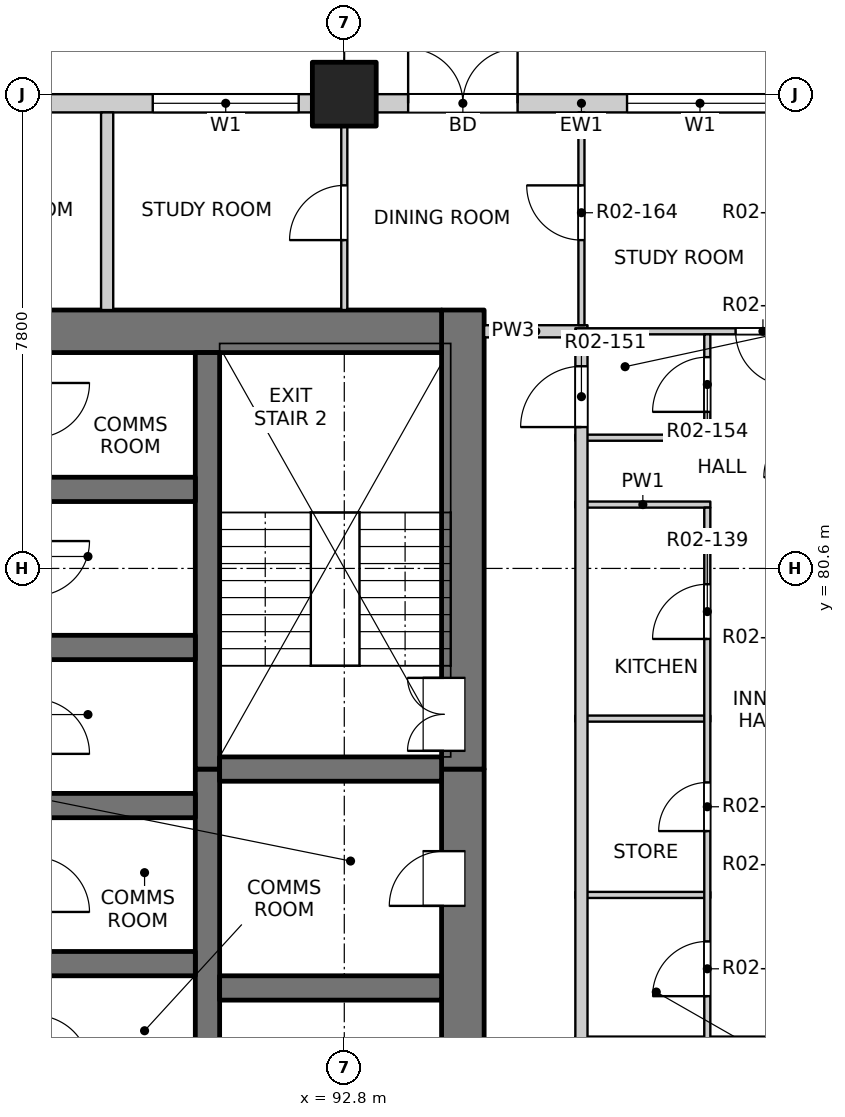
"""IFC4 building model, lengths in metres.
Left out: names, types, materials, properties, quantities, classifications, styles, units other than length and angle.
Written with IfcOpenShell. Run it as: python <this file> out.ifc"""

import sys

from ifc_helpers import new_model, si_unit, direction, frame, frame_2d, origin, origin_2d, place, context, subcontext, project, spatial, rectangle, extrude, element, fill, save


model = new_model("IFC4")
c1 = context("Model", 3, precision=1e-05, world=origin(), true_north=direction((0.0, 1.0)))
c2 = subcontext(c1, "Body", "Model", "MODEL_VIEW")
j1 = project(units=[si_unit("LENGTHUNIT", "METRE"), si_unit("PLANEANGLEUNIT", "RADIAN")], contexts=[c1])
p1 = place(None, origin())
s1 = spatial("IfcSite", under=j1, at=p1, CompositionType="ELEMENT")
p2 = place(p1, origin())
s2 = spatial("IfcBuilding", under=s1, at=p2, CompositionType="ELEMENT")
p3 = place(p2, frame((0.0, 0.0, 36.5)))
s3 = spatial("IfcBuildingStorey", under=s2, at=p3, CompositionType="ELEMENT", Elevation=36.5)
p4 = place(p3, frame((92.8, 88.4, -0.25), z_axis=(0.0, 0.0, 1.0), x_axis=(1.0, 0.0, 0.0)))
e1 = element("IfcColumn", 1, at=p4, inside=s3, PredefinedType="COLUMN", context=c2, shape_type="SweptSolid", body=[
    extrude(rectangle(XDim=1.05, YDim=1.05, at=origin_2d()), origin(), (0.0, 0.0, 1.0), 3.4),
])
p5 = place(p3, frame((94.75, 61.95, -0.25), z_axis=(0.0, 0.0, 1.0), x_axis=(0.0, 1.0, 0.0)))
e2 = element("IfcWall", 2, at=p5, inside=s3, PredefinedType="SOLIDWALL", context=c2, shape_type="SweptSolid", body=[
    extrude(rectangle(XDim=15.35, YDim=0.7, at=frame_2d((7.675, 0.0))), origin(), (0.0, 0.0, 1.0), 3.4),
])
p6 = place(p5, frame((0.925, 0.0, 0.25)))
e3 = element("IfcOpeningElement", 3, at=p6, cuts=e2, PredefinedType="OPENING", context=c2, shape_type="SweptSolid", body=[
    extrude(rectangle(XDim=0.9, YDim=2.1, at=frame_2d((0.45, 1.05))), frame((0.0, 0.36, 0.0), z_axis=(0.0, -1.0, 0.0), x_axis=(1.0, 0.0, 0.0)), (0.0, 0.0, 1.0), 0.72),
])
p7 = place(p5, frame((3.8, 0.0, 0.25)))
e4 = element("IfcOpeningElement", 4, at=p7, cuts=e2, PredefinedType="OPENING", context=c2, shape_type="SweptSolid", body=[
    extrude(rectangle(XDim=0.9, YDim=2.1, at=frame_2d((0.45, 1.05))), frame((0.0, 0.36, 0.0), z_axis=(0.0, -1.0, 0.0), x_axis=(1.0, 0.0, 0.0)), (0.0, 0.0, 1.0), 0.72),
])
p8 = place(p5, frame((6.8, 0.0, 0.25)))
e5 = element("IfcOpeningElement", 5, at=p8, cuts=e2, PredefinedType="OPENING", context=c2, shape_type="SweptSolid", body=[
    extrude(rectangle(XDim=0.9, YDim=2.1, at=frame_2d((0.45, 1.05))), frame((0.0, 0.36, 0.0), z_axis=(0.0, -1.0, 0.0), x_axis=(1.0, 0.0, 0.0)), (0.0, 0.0, 1.0), 0.72),
])
p9 = place(p5, frame((9.8, 0.0, 0.25)))
e6 = element("IfcOpeningElement", 6, at=p9, cuts=e2, PredefinedType="OPENING", context=c2, shape_type="SweptSolid", body=[
    extrude(rectangle(XDim=0.9, YDim=2.1, at=frame_2d((0.45, 1.05))), frame((0.0, 0.36, 0.0), z_axis=(0.0, -1.0, 0.0), x_axis=(1.0, 0.0, 0.0)), (0.0, 0.0, 1.0), 0.72),
])
p10 = place(p5, frame((13.1, 0.0, 0.25)))
e7 = element("IfcOpeningElement", 7, at=p10, cuts=e2, PredefinedType="OPENING", context=c2, shape_type="SweptSolid", body=[
    extrude(rectangle(XDim=0.9, YDim=2.1, at=frame_2d((0.45, 1.05))), frame((0.0, 0.36, 0.0), z_axis=(0.0, -1.0, 0.0), x_axis=(1.0, 0.0, 0.0)), (0.0, 0.0, 1.0), 0.72),
])
p11 = place(p3, frame((94.75, 77.3, -0.25), z_axis=(0.0, 0.0, 1.0), x_axis=(0.0, 1.0, 0.0)))
e8 = element("IfcWall", 8, at=p11, inside=s3, PredefinedType="SOLIDWALL", context=c2, shape_type="SweptSolid", body=[
    extrude(rectangle(XDim=7.55, YDim=0.7, at=frame_2d((3.775, 0.0))), origin(), (0.0, 0.0, 1.0), 3.4),
])
p12 = place(p11, frame((0.3, 0.0, 0.25)))
e9 = element("IfcOpeningElement", 9, at=p12, cuts=e8, PredefinedType="OPENING", context=c2, shape_type="SweptSolid", body=[
    extrude(rectangle(XDim=1.2, YDim=2.1, at=frame_2d((0.6, 1.05))), frame((0.0, 0.36, 0.0), z_axis=(0.0, -1.0, 0.0), x_axis=(1.0, 0.0, 0.0)), (0.0, 0.0, 1.0), 0.72),
])
p13 = place(p3, frame((75.6, 84.5, -0.25), z_axis=(0.0, 0.0, 1.0), x_axis=(1.0, 0.0, 0.0)))
e10 = element("IfcWall", 10, at=p13, inside=s3, PredefinedType="SOLIDWALL", context=c2, shape_type="SweptSolid", body=[
    extrude(rectangle(XDim=18.8, YDim=0.7, at=frame_2d((9.4, 0.0))), origin(), (0.0, 0.0, 1.0), 3.4),
])
p14 = place(p3, frame((90.55, 61.95, -0.25), z_axis=(0.0, 0.0, 1.0), x_axis=(0.0, 1.0, 0.0)))
e11 = element("IfcWall", 11, at=p14, inside=s3, PredefinedType="SOLIDWALL", context=c2, shape_type="SweptSolid", body=[
    extrude(rectangle(XDim=15.35, YDim=0.4, at=frame_2d((7.675, 0.0))), origin(), (0.0, 0.0, 1.0), 3.4),
])
p15 = place(p3, frame((90.55, 77.3, -0.25), z_axis=(0.0, 0.0, 1.0), x_axis=(0.0, 1.0, 0.0)))
e12 = element("IfcWall", 12, at=p15, inside=s3, PredefinedType="SOLIDWALL", context=c2, shape_type="SweptSolid", body=[
    extrude(rectangle(XDim=6.85, YDim=0.4, at=frame_2d((3.425, 0.0))), origin(), (0.0, 0.0, 1.0), 3.4),
])
for number, where, z_axis, x_axis in (
    (13, (87.35, 74.1, -0.25), (0.0, 0.0, 1.0), (1.0, 0.0, 0.0)),
    (14, (87.35, 76.7, -0.25), (0.0, 0.0, 1.0), (1.0, 0.0, 0.0)),
    (15, (87.35, 79.3, -0.25), (0.0, 0.0, 1.0), (1.0, 0.0, 0.0)),
    (16, (87.35, 81.9, -0.25), (0.0, 0.0, 1.0), (1.0, 0.0, 0.0)),
):
    element("IfcWall", number, at=place(p3, frame(where, z_axis=z_axis, x_axis=x_axis)), inside=s3, PredefinedType="SOLIDWALL", context=c2, shape_type="SweptSolid", body=[
        extrude(rectangle(XDim=3.0, YDim=0.4, at=frame_2d((1.5, 0.0))), origin(), (0.0, 0.0, 1.0), 3.4),
    ])
for number, where, z_axis, x_axis in (
    (17, (90.75, 73.7, -0.25), (0.0, 0.0, 1.0), (1.0, 0.0, 0.0)),
    (18, (90.75, 77.3, -0.25), (0.0, 0.0, 1.0), (1.0, 0.0, 0.0)),
):
    element("IfcWall", number, at=place(p3, frame(where, z_axis=z_axis, x_axis=x_axis)), inside=s3, PredefinedType="SOLIDWALL", context=c2, shape_type="SweptSolid", body=[
        extrude(rectangle(XDim=3.65, YDim=0.4, at=frame_2d((1.825, 0.0))), origin(), (0.0, 0.0, 1.0), 3.4),
    ])
p16 = place(p3, frame((85.525, 88.25, 0.0), z_axis=(0.0, 0.0, 1.0), x_axis=(1.0, 0.0, 0.0)))
e19 = element("IfcWall", 19, at=p16, inside=s3, PredefinedType="SOLIDWALL", context=c2, shape_type="SweptSolid", body=[
    extrude(rectangle(XDim=6.75, YDim=0.3, at=frame_2d((3.375, 0.0))), origin(), (0.0, 0.0, 1.0), 2.7),
])
p17 = place(p16, frame((0.525, 0.0, 0.0)))
e20 = element("IfcOpeningElement", 20, at=p17, cuts=e19, PredefinedType="OPENING", context=c2, shape_type="SweptSolid", body=[
    extrude(rectangle(XDim=1.8, YDim=2.4, at=frame_2d((0.9, 1.2))), frame((0.0, 0.16, 0.0), z_axis=(0.0, -1.0, 0.0), x_axis=(1.0, 0.0, 0.0)), (0.0, 0.0, 1.0), 0.32),
])
p18 = place(p16, frame((4.125, 0.0, 0.9)))
e21 = element("IfcOpeningElement", 21, at=p18, cuts=e19, PredefinedType="OPENING", context=c2, shape_type="SweptSolid", body=[
    extrude(rectangle(XDim=2.4, YDim=1.8, at=frame_2d((1.2, 0.9))), frame((0.0, 0.16, 0.0), z_axis=(0.0, -1.0, 0.0), x_axis=(1.0, 0.0, 0.0)), (0.0, 0.0, 1.0), 0.32),
])
p19 = place(p3, frame((93.325, 88.25, 0.0), z_axis=(0.0, 0.0, 1.0), x_axis=(1.0, 0.0, 0.0)))
e22 = element("IfcWall", 22, at=p19, inside=s3, PredefinedType="SOLIDWALL", context=c2, shape_type="SweptSolid", body=[
    extrude(rectangle(XDim=6.75, YDim=0.3, at=frame_2d((3.375, 0.0))), origin(), (0.0, 0.0, 1.0), 2.7),
])
p20 = place(p19, frame((0.525, 0.0, 0.0)))
e23 = element("IfcOpeningElement", 23, at=p20, cuts=e22, PredefinedType="OPENING", context=c2, shape_type="SweptSolid", body=[
    extrude(rectangle(XDim=1.8, YDim=2.4, at=frame_2d((0.9, 1.2))), frame((0.0, 0.16, 0.0), z_axis=(0.0, -1.0, 0.0), x_axis=(1.0, 0.0, 0.0)), (0.0, 0.0, 1.0), 0.32),
])
p21 = place(p19, frame((4.125, 0.0, 0.9)))
e24 = element("IfcOpeningElement", 24, at=p21, cuts=e22, PredefinedType="OPENING", context=c2, shape_type="SweptSolid", body=[
    extrude(rectangle(XDim=2.4, YDim=1.8, at=frame_2d((1.2, 0.9))), frame((0.0, 0.16, 0.0), z_axis=(0.0, -1.0, 0.0), x_axis=(1.0, 0.0, 0.0)), (0.0, 0.0, 1.0), 0.32),
])
p22 = place(p3, frame((96.6, 72.8, 0.0), z_axis=(0.0, 0.0, 1.0), x_axis=(1.0, 0.0, 0.0)))
e25 = element("IfcWall", 25, at=p22, inside=s3, PredefinedType="PARTITIONING", context=c2, shape_type="SweptSolid", body=[
    extrude(rectangle(XDim=4.0, YDim=0.2, at=frame_2d((2.0, 0.0))), origin(), (0.0, 0.0, 1.0), 3.15),
])
for number, where, z_axis, x_axis in (
    (26, (96.6, 75.23, 0.0), (0.0, 0.0, 1.0), (1.0, 0.0, 0.0)),
    (27, (96.6, 78.13, 0.0), (0.0, 0.0, 1.0), (1.0, 0.0, 0.0)),
    (28, (96.6, 81.65, 0.0), (0.0, 0.0, 1.0), (1.0, 0.0, 0.0)),
    (29, (96.6, 82.75, 0.0), (0.0, 0.0, 1.0), (1.0, 0.0, 0.0)),
):
    element("IfcWall", number, at=place(p3, frame(where, z_axis=z_axis, x_axis=x_axis)), inside=s3, PredefinedType="PARTITIONING", context=c2, shape_type="SweptSolid", body=[
        extrude(rectangle(XDim=2.22, YDim=0.1, at=frame_2d((1.11, 0.0))), origin(), (0.0, 0.0, 1.0), 3.15),
    ])
p23 = place(p3, frame((95.1, 84.5, 0.0), z_axis=(0.0, 0.0, 1.0), x_axis=(1.0, 0.0, 0.0)))
e30 = element("IfcWall", 30, at=p23, inside=s3, PredefinedType="PARTITIONING", context=c2, shape_type="SweptSolid", body=[
    extrude(rectangle(XDim=1.7, YDim=0.2, at=frame_2d((0.85, 0.0))), origin(), (0.0, 0.0, 1.0), 3.15),
])
p24 = place(p3, frame((96.6, 84.5, 0.0), z_axis=(0.0, 0.0, 1.0), x_axis=(1.0, 0.0, 0.0)))
e31 = element("IfcWall", 31, at=p24, inside=s3, PredefinedType="PARTITIONING", context=c2, shape_type="SweptSolid", body=[
    extrude(rectangle(XDim=11.5, YDim=0.1, at=frame_2d((5.75, 0.0))), origin(), (0.0, 0.0, 1.0), 3.15),
])
p25 = place(p24, frame((2.635, 0.0, 0.0)))
e32 = element("IfcOpeningElement", 32, at=p25, cuts=e31, PredefinedType="OPENING", context=c2, shape_type="SweptSolid", body=[
    extrude(rectangle(XDim=0.9, YDim=2.1, at=frame_2d((0.45, 1.05))), frame((0.0, 0.06, 0.0), z_axis=(0.0, -1.0, 0.0), x_axis=(1.0, 0.0, 0.0)), (0.0, 0.0, 1.0), 0.12),
])
p26 = place(p3, frame((88.9, 84.85, 0.0), z_axis=(0.0, 0.0, 1.0), x_axis=(0.0, 1.0, 0.0)))
e33 = element("IfcWall", 33, at=p26, inside=s3, PredefinedType="PARTITIONING", context=c2, shape_type="SweptSolid", body=[
    extrude(rectangle(XDim=3.25, YDim=0.2, at=frame_2d((1.625, 0.0))), origin(), (0.0, 0.0, 1.0), 3.15),
])
p27 = place(p3, frame((92.8, 84.85, 0.0), z_axis=(0.0, 0.0, 1.0), x_axis=(0.0, 1.0, 0.0)))
e34 = element("IfcWall", 34, at=p27, inside=s3, PredefinedType="PARTITIONING", context=c2, shape_type="SweptSolid", body=[
    extrude(rectangle(XDim=3.25, YDim=0.1, at=frame_2d((1.625, 0.0))), origin(), (0.0, 0.0, 1.0), 3.15),
])
p28 = place(p27, frame((1.15, 0.0, 0.0)))
e35 = element("IfcOpeningElement", 35, at=p28, cuts=e34, PredefinedType="OPENING", context=c2, shape_type="SweptSolid", body=[
    extrude(rectangle(XDim=0.9, YDim=2.1, at=frame_2d((0.45, 1.05))), frame((0.0, 0.06, 0.0), z_axis=(0.0, -1.0, 0.0), x_axis=(1.0, 0.0, 0.0)), (0.0, 0.0, 1.0), 0.12),
])
p29 = place(p3, frame((96.7, 53.4, 0.0), z_axis=(0.0, 0.0, 1.0), x_axis=(0.0, 1.0, 0.0)))
e36 = element("IfcWall", 36, at=p29, inside=s3, PredefinedType="PARTITIONING", context=c2, shape_type="SweptSolid", body=[
    extrude(rectangle(XDim=31.0, YDim=0.2, at=frame_2d((15.5, 0.0))), origin(), (0.0, 0.0, 1.0), 3.15),
])
p30 = place(p29, frame((2.425, 0.0, 0.0)))
e37 = element("IfcOpeningElement", 37, at=p30, cuts=e36, PredefinedType="OPENING", context=c2, shape_type="SweptSolid", body=[
    extrude(rectangle(XDim=1.0, YDim=2.1, at=frame_2d((0.5, 1.05))), frame((0.0, 0.11, 0.0), z_axis=(0.0, -1.0, 0.0), x_axis=(1.0, 0.0, 0.0)), (0.0, 0.0, 1.0), 0.22),
])
p31 = place(p29, frame((13.375, 0.0, 0.0)))
e38 = element("IfcOpeningElement", 38, at=p31, cuts=e36, PredefinedType="OPENING", context=c2, shape_type="SweptSolid", body=[
    extrude(rectangle(XDim=1.0, YDim=2.1, at=frame_2d((0.5, 1.05))), frame((0.0, 0.11, 0.0), z_axis=(0.0, -1.0, 0.0), x_axis=(1.0, 0.0, 0.0)), (0.0, 0.0, 1.0), 0.22),
])
p32 = place(p29, frame((29.525, 0.0, 0.0)))
e39 = element("IfcOpeningElement", 39, at=p32, cuts=e36, PredefinedType="OPENING", context=c2, shape_type="SweptSolid", body=[
    extrude(rectangle(XDim=1.0, YDim=2.1, at=frame_2d((0.5, 1.05))), frame((0.0, 0.11, 0.0), z_axis=(0.0, -1.0, 0.0), x_axis=(1.0, 0.0, 0.0)), (0.0, 0.0, 1.0), 0.22),
])
p33 = place(p3, frame((96.7, 84.6, 0.0), z_axis=(0.0, 0.0, 1.0), x_axis=(0.0, 1.0, 0.0)))
e40 = element("IfcWall", 40, at=p33, inside=s3, PredefinedType="PARTITIONING", context=c2, shape_type="SweptSolid", body=[
    extrude(rectangle(XDim=3.5, YDim=0.1, at=frame_2d((1.75, 0.0))), origin(), (0.0, 0.0, 1.0), 3.15),
])
p34 = place(p33, frame((1.4, 0.0, 0.0)))
e41 = element("IfcOpeningElement", 41, at=p34, cuts=e40, PredefinedType="OPENING", context=c2, shape_type="SweptSolid", body=[
    extrude(rectangle(XDim=0.9, YDim=2.1, at=frame_2d((0.45, 1.05))), frame((0.0, 0.06, 0.0), z_axis=(0.0, -1.0, 0.0), x_axis=(1.0, 0.0, 0.0)), (0.0, 0.0, 1.0), 0.12),
])
p35 = place(p3, frame((98.77, 66.65, 0.0), z_axis=(0.0, 0.0, 1.0), x_axis=(0.0, 1.0, 0.0)))
e42 = element("IfcWall", 42, at=p35, inside=s3, PredefinedType="PARTITIONING", context=c2, shape_type="SweptSolid", body=[
    extrude(rectangle(XDim=14.95, YDim=0.1, at=frame_2d((7.475, 0.0))), origin(), (0.0, 0.0, 1.0), 3.15),
])
p36 = place(p35, frame((0.925, 0.0, 0.0)))
e43 = element("IfcOpeningElement", 43, at=p36, cuts=e42, PredefinedType="OPENING", context=c2, shape_type="SweptSolid", body=[
    extrude(rectangle(XDim=0.8, YDim=2.1, at=frame_2d((0.4, 1.05))), frame((0.0, 0.06, 0.0), z_axis=(0.0, -1.0, 0.0), x_axis=(1.0, 0.0, 0.0)), (0.0, 0.0, 1.0), 0.12),
])
p37 = place(p35, frame((3.975, 0.0, 0.0)))
e44 = element("IfcOpeningElement", 44, at=p37, cuts=e42, PredefinedType="OPENING", context=c2, shape_type="SweptSolid", body=[
    extrude(rectangle(XDim=0.9, YDim=2.1, at=frame_2d((0.45, 1.05))), frame((0.0, 0.06, 0.0), z_axis=(0.0, -1.0, 0.0), x_axis=(1.0, 0.0, 0.0)), (0.0, 0.0, 1.0), 0.12),
])
p38 = place(p35, frame((6.915, 0.0, 0.0)))
e45 = element("IfcOpeningElement", 45, at=p38, cuts=e42, PredefinedType="OPENING", context=c2, shape_type="SweptSolid", body=[
    extrude(rectangle(XDim=0.9, YDim=2.1, at=frame_2d((0.45, 1.05))), frame((0.0, 0.06, 0.0), z_axis=(0.0, -1.0, 0.0), x_axis=(1.0, 0.0, 0.0)), (0.0, 0.0, 1.0), 0.12),
])
p39 = place(p35, frame((9.63, 0.0, 0.0)))
e46 = element("IfcOpeningElement", 46, at=p39, cuts=e42, PredefinedType="OPENING", context=c2, shape_type="SweptSolid", body=[
    extrude(rectangle(XDim=0.8, YDim=2.1, at=frame_2d((0.4, 1.05))), frame((0.0, 0.06, 0.0), z_axis=(0.0, -1.0, 0.0), x_axis=(1.0, 0.0, 0.0)), (0.0, 0.0, 1.0), 0.12),
])
p40 = place(p35, frame((12.79, 0.0, 0.0)))
e47 = element("IfcOpeningElement", 47, at=p40, cuts=e42, PredefinedType="OPENING", context=c2, shape_type="SweptSolid", body=[
    extrude(rectangle(XDim=0.9, YDim=2.1, at=frame_2d((0.45, 1.05))), frame((0.0, 0.06, 0.0), z_axis=(0.0, -1.0, 0.0), x_axis=(1.0, 0.0, 0.0)), (0.0, 0.0, 1.0), 0.12),
])
p41 = place(p3, frame((98.77, 82.8, 0.0), z_axis=(0.0, 0.0, 1.0), x_axis=(0.0, 1.0, 0.0)))
e48 = element("IfcWall", 48, at=p41, inside=s3, PredefinedType="PARTITIONING", context=c2, shape_type="SweptSolid", body=[
    extrude(rectangle(XDim=1.65, YDim=0.1, at=frame_2d((0.825, 0.0))), origin(), (0.0, 0.0, 1.0), 3.15),
])
p42 = place(p41, frame((0.375, 0.0, 0.0)))
e49 = element("IfcOpeningElement", 49, at=p42, cuts=e48, PredefinedType="OPENING", context=c2, shape_type="SweptSolid", body=[
    extrude(rectangle(XDim=0.9, YDim=2.1, at=frame_2d((0.45, 1.05))), frame((0.0, 0.06, 0.0), z_axis=(0.0, -1.0, 0.0), x_axis=(1.0, 0.0, 0.0)), (0.0, 0.0, 1.0), 0.12),
])
p43 = place(p18, origin())
e50 = element("IfcWindow", 50, at=p43, inside=s3, PartitioningType="DOUBLE_PANEL_VERTICAL", PredefinedType="WINDOW", context=c2, shape_type="SweptSolid", body=[
    extrude(rectangle(XDim=2.4, YDim=1.8, at=frame_2d((1.2, 0.9))), frame((0.0, 0.03, 0.0), z_axis=(0.0, -1.0, 0.0), x_axis=(1.0, 0.0, 0.0)), (0.0, 0.0, 1.0), 0.06),
])
fill(e21, e50)
p44 = place(p20, origin())
e51 = element("IfcDoor", 51, at=p44, inside=s3, OperationType="DOUBLE_DOOR_SINGLE_SWING", PredefinedType="DOOR", context=c2, shape_type="SweptSolid", body=[
    extrude(rectangle(XDim=1.8, YDim=2.4, at=frame_2d((0.9, 1.2))), frame((0.0, 0.025, 0.0), z_axis=(0.0, -1.0, 0.0), x_axis=(1.0, 0.0, 0.0)), (0.0, 0.0, 1.0), 0.05),
])
fill(e23, e51)
p45 = place(p21, origin())
e52 = element("IfcWindow", 52, at=p45, inside=s3, PartitioningType="DOUBLE_PANEL_VERTICAL", PredefinedType="WINDOW", context=c2, shape_type="SweptSolid", body=[
    extrude(rectangle(XDim=2.4, YDim=1.8, at=frame_2d((1.2, 0.9))), frame((0.0, 0.03, 0.0), z_axis=(0.0, -1.0, 0.0), x_axis=(1.0, 0.0, 0.0)), (0.0, 0.0, 1.0), 0.06),
])
fill(e24, e52)
p46 = place(p38, origin())
e53 = element("IfcDoor", 53, at=p46, inside=s3, OperationType="SINGLE_SWING_LEFT", PredefinedType="DOOR", context=c2, shape_type="SweptSolid", body=[
    extrude(rectangle(XDim=0.9, YDim=2.1, at=frame_2d((0.45, 1.05))), frame((0.0, 0.025, 0.0), z_axis=(0.0, -1.0, 0.0), x_axis=(1.0, 0.0, 0.0)), (0.0, 0.0, 1.0), 0.05),
])
fill(e45, e53)
p47 = place(p10, origin())
e54 = element("IfcDoor", 54, at=p47, inside=s3, OperationType="SINGLE_SWING_LEFT", PredefinedType="DOOR", context=c2, shape_type="SweptSolid", body=[
    extrude(rectangle(XDim=0.9, YDim=2.1, at=frame_2d((0.45, 1.05))), frame((0.0, 0.335, 0.0), z_axis=(0.0, -1.0, 0.0), x_axis=(1.0, 0.0, 0.0)), (0.0, 0.0, 1.0), 0.05),
])
fill(e7, e54)
p48 = place(p39, origin())
e55 = element("IfcDoor", 55, at=p48, inside=s3, OperationType="SINGLE_SWING_LEFT", PredefinedType="DOOR", context=c2, shape_type="SweptSolid", body=[
    extrude(rectangle(XDim=0.8, YDim=2.1, at=frame_2d((0.4, 1.05))), frame((0.0, 0.025, 0.0), z_axis=(0.0, -1.0, 0.0), x_axis=(1.0, 0.0, 0.0)), (0.0, 0.0, 1.0), 0.05),
])
fill(e46, e55)
p49 = place(p12, origin())
e56 = element("IfcDoor", 56, at=p49, inside=s3, OperationType="DOUBLE_DOOR_SINGLE_SWING", PredefinedType="DOOR", context=c2, shape_type="SweptSolid", body=[
    extrude(rectangle(XDim=1.2, YDim=2.1, at=frame_2d((0.6, 1.05))), frame((0.0, 0.335, 0.0), z_axis=(0.0, -1.0, 0.0), x_axis=(1.0, 0.0, 0.0)), (0.0, 0.0, 1.0), 0.05),
])
fill(e9, e56)
p50 = place(p40, origin())
e57 = element("IfcDoor", 57, at=p50, inside=s3, OperationType="SINGLE_SWING_LEFT", PredefinedType="DOOR", context=c2, shape_type="SweptSolid", body=[
    extrude(rectangle(XDim=0.9, YDim=2.1, at=frame_2d((0.45, 1.05))), frame((0.0, 0.025, 0.0), z_axis=(0.0, -1.0, 0.0), x_axis=(1.0, 0.0, 0.0)), (0.0, 0.0, 1.0), 0.05),
])
fill(e47, e57)
p51 = place(p32, origin())
e58 = element("IfcDoor", 58, at=p51, inside=s3, OperationType="SINGLE_SWING_LEFT", PredefinedType="DOOR", context=c2, shape_type="SweptSolid", body=[
    extrude(rectangle(XDim=1.0, YDim=2.1, at=frame_2d((0.5, 1.05))), frame((0.0, 0.025, 0.0), z_axis=(0.0, -1.0, 0.0), x_axis=(1.0, 0.0, 0.0)), (0.0, 0.0, 1.0), 0.05),
])
fill(e39, e58)
p52 = place(p42, origin())
e59 = element("IfcDoor", 59, at=p52, inside=s3, OperationType="SINGLE_SWING_LEFT", PredefinedType="DOOR", context=c2, shape_type="SweptSolid", body=[
    extrude(rectangle(XDim=0.9, YDim=2.1, at=frame_2d((0.45, 1.05))), frame((0.0, 0.025, 0.0), z_axis=(0.0, -1.0, 0.0), x_axis=(1.0, 0.0, 0.0)), (0.0, 0.0, 1.0), 0.05),
])
fill(e49, e59)
p53 = place(p25, origin())
e60 = element("IfcDoor", 60, at=p53, inside=s3, OperationType="SINGLE_SWING_LEFT", PredefinedType="DOOR", context=c2, shape_type="SweptSolid", body=[
    extrude(rectangle(XDim=0.9, YDim=2.1, at=frame_2d((0.45, 1.05))), frame((0.0, 0.025, 0.0), z_axis=(0.0, -1.0, 0.0), x_axis=(1.0, 0.0, 0.0)), (0.0, 0.0, 1.0), 0.05),
])
fill(e32, e60)
p54 = place(p28, origin())
e61 = element("IfcDoor", 61, at=p54, inside=s3, OperationType="SINGLE_SWING_LEFT", PredefinedType="DOOR", context=c2, shape_type="SweptSolid", body=[
    extrude(rectangle(XDim=0.9, YDim=2.1, at=frame_2d((0.45, 1.05))), frame((0.0, 0.025, 0.0), z_axis=(0.0, -1.0, 0.0), x_axis=(1.0, 0.0, 0.0)), (0.0, 0.0, 1.0), 0.05),
])
fill(e35, e61)
p55 = place(p34, origin())
e62 = element("IfcDoor", 62, at=p55, inside=s3, OperationType="SINGLE_SWING_RIGHT", PredefinedType="DOOR", context=c2, shape_type="SweptSolid", body=[
    extrude(rectangle(XDim=0.9, YDim=2.1, at=frame_2d((0.45, 1.05))), frame((0.0, 0.025, 0.0), z_axis=(0.0, -1.0, 0.0), x_axis=(1.0, 0.0, 0.0)), (0.0, 0.0, 1.0), 0.05),
])
fill(e41, e62)
save(model, sys.argv[1])
